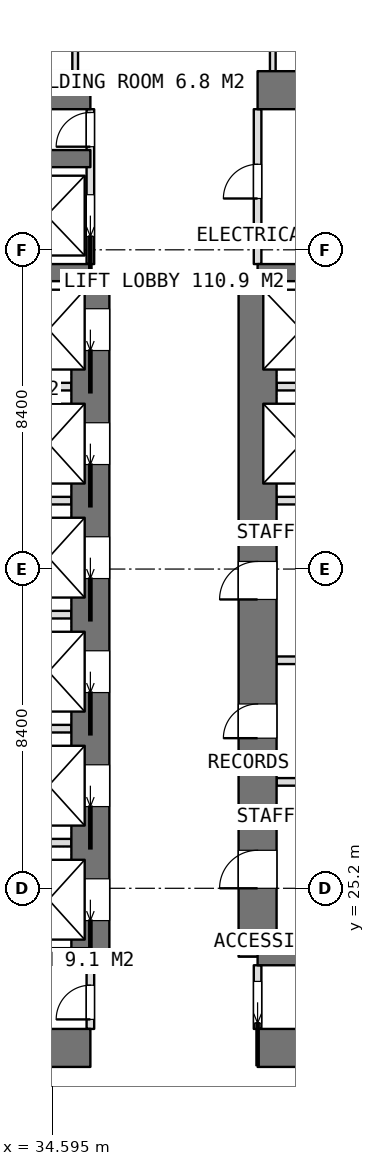
"""IFC4 building model, lengths in metres.
Left out: names, types, materials, properties, quantities, classifications, styles, units other than length and angle.
Written with IfcOpenShell. Run it as: python <this file> out.ifc"""

import sys

from ifc_helpers import new_model, si_unit, direction, frame, frame_2d, origin, place, context, subcontext, project, spatial, rectangle, extrude, element, fill, save


model = new_model("IFC4")
c1 = context("Model", 3, precision=1e-05, world=origin(), true_north=direction((0.0, 1.0)))
c2 = subcontext(c1, "Body", "Model", "MODEL_VIEW")
j1 = project(units=[si_unit("LENGTHUNIT", "METRE"), si_unit("PLANEANGLEUNIT", "RADIAN")], contexts=[c1])
p1 = place(None, origin())
s1 = spatial("IfcSite", under=j1, at=p1, CompositionType="ELEMENT")
p2 = place(p1, origin())
s2 = spatial("IfcBuilding", under=s1, at=p2, CompositionType="ELEMENT")
p3 = place(p2, frame((0.0, 0.0, 228.95)))
s3 = spatial("IfcBuildingStorey", under=s2, at=p3, CompositionType="ELEMENT", Elevation=228.95)
p4 = place(p3, frame((25.2, 21.0, 0.0), z_axis=(0.0, 0.0, 1.0), x_axis=(1.0, 0.0, 0.0)))
e1 = element("IfcWall", 1, at=p4, inside=s3, PredefinedType="SHEAR", context=c2, shape_type="SweptSolid", body=[
    extrude(rectangle(XDim=10.4, YDim=1.0, at=frame_2d((5.2, 0.0))), origin(), (0.0, 0.0, 1.0), 3.75),
])
p5 = place(p3, frame((40.0, 21.0, 0.0), z_axis=(0.0, 0.0, 1.0), x_axis=(1.0, 0.0, 0.0)))
e2 = element("IfcWall", 2, at=p5, inside=s3, PredefinedType="SHEAR", context=c2, shape_type="SweptSolid", body=[
    extrude(rectangle(XDim=10.4, YDim=1.0, at=frame_2d((5.2, 0.0))), origin(), (0.0, 0.0, 1.0), 3.75),
])
p6 = place(p3, frame((25.2, 46.2, 0.0), z_axis=(0.0, 0.0, 1.0), x_axis=(1.0, 0.0, 0.0)))
e3 = element("IfcWall", 3, at=p6, inside=s3, PredefinedType="SHEAR", context=c2, shape_type="SweptSolid", body=[
    extrude(rectangle(XDim=10.4, YDim=1.0, at=frame_2d((5.2, 0.0))), origin(), (0.0, 0.0, 1.0), 3.75),
])
p7 = place(p3, frame((40.0, 46.2, 0.0), z_axis=(0.0, 0.0, 1.0), x_axis=(1.0, 0.0, 0.0)))
e4 = element("IfcWall", 4, at=p7, inside=s3, PredefinedType="SHEAR", context=c2, shape_type="SweptSolid", body=[
    extrude(rectangle(XDim=10.4, YDim=1.0, at=frame_2d((5.2, 0.0))), origin(), (0.0, 0.0, 1.0), 3.75),
])
p8 = place(p3, frame((35.6, 23.4, 0.0), z_axis=(0.0, 0.0, 1.0), x_axis=(0.0, 1.0, 0.0)))
e5 = element("IfcWall", 5, at=p8, inside=s3, PredefinedType="SHEAR", context=c2, shape_type="SweptSolid", body=[
    extrude(rectangle(XDim=18.0, YDim=1.0, at=frame_2d((9.0, 0.0))), origin(), (0.0, 0.0, 1.0), 3.75),
])
p9 = place(p8, frame((0.95, 0.0, 0.0)))
e6 = element("IfcOpeningElement", 6, at=p9, cuts=e5, PredefinedType="OPENING", context=c2, shape_type="SweptSolid", body=[
    extrude(rectangle(XDim=1.1, YDim=2.1, at=frame_2d((0.55, 1.05))), frame((0.0, 0.51, 0.0), z_axis=(0.0, -1.0, 0.0), x_axis=(1.0, 0.0, 0.0)), (0.0, 0.0, 1.0), 1.02),
])
p10 = place(p8, frame((3.95, 0.0, 0.0)))
e7 = element("IfcOpeningElement", 7, at=p10, cuts=e5, PredefinedType="OPENING", context=c2, shape_type="SweptSolid", body=[
    extrude(rectangle(XDim=1.1, YDim=2.1, at=frame_2d((0.55, 1.05))), frame((0.0, 0.51, 0.0), z_axis=(0.0, -1.0, 0.0), x_axis=(1.0, 0.0, 0.0)), (0.0, 0.0, 1.0), 1.02),
])
p11 = place(p8, frame((6.95, 0.0, 0.0)))
e8 = element("IfcOpeningElement", 8, at=p11, cuts=e5, PredefinedType="OPENING", context=c2, shape_type="SweptSolid", body=[
    extrude(rectangle(XDim=1.1, YDim=2.1, at=frame_2d((0.55, 1.05))), frame((0.0, 0.51, 0.0), z_axis=(0.0, -1.0, 0.0), x_axis=(1.0, 0.0, 0.0)), (0.0, 0.0, 1.0), 1.02),
])
p12 = place(p8, frame((9.95, 0.0, 0.0)))
e9 = element("IfcOpeningElement", 9, at=p12, cuts=e5, PredefinedType="OPENING", context=c2, shape_type="SweptSolid", body=[
    extrude(rectangle(XDim=1.1, YDim=2.1, at=frame_2d((0.55, 1.05))), frame((0.0, 0.51, 0.0), z_axis=(0.0, -1.0, 0.0), x_axis=(1.0, 0.0, 0.0)), (0.0, 0.0, 1.0), 1.02),
])
p13 = place(p8, frame((12.95, 0.0, 0.0)))
e10 = element("IfcOpeningElement", 10, at=p13, cuts=e5, PredefinedType="OPENING", context=c2, shape_type="SweptSolid", body=[
    extrude(rectangle(XDim=1.1, YDim=2.1, at=frame_2d((0.55, 1.05))), frame((0.0, 0.51, 0.0), z_axis=(0.0, -1.0, 0.0), x_axis=(1.0, 0.0, 0.0)), (0.0, 0.0, 1.0), 1.02),
])
p14 = place(p8, frame((15.95, 0.0, 0.0)))
e11 = element("IfcOpeningElement", 11, at=p14, cuts=e5, PredefinedType="OPENING", context=c2, shape_type="SweptSolid", body=[
    extrude(rectangle(XDim=1.1, YDim=2.1, at=frame_2d((0.55, 1.05))), frame((0.0, 0.51, 0.0), z_axis=(0.0, -1.0, 0.0), x_axis=(1.0, 0.0, 0.0)), (0.0, 0.0, 1.0), 1.02),
])
p15 = place(p3, frame((40.0, 23.4, 0.0), z_axis=(0.0, 0.0, 1.0), x_axis=(0.0, 1.0, 0.0)))
e12 = element("IfcWall", 12, at=p15, inside=s3, PredefinedType="SHEAR", context=c2, shape_type="SweptSolid", body=[
    extrude(rectangle(XDim=18.0, YDim=1.0, at=frame_2d((9.0, 0.0))), origin(), (0.0, 0.0, 1.0), 3.75),
])
p16 = place(p15, frame((1.8, 0.0, 0.0)))
e13 = element("IfcOpeningElement", 13, at=p16, cuts=e12, PredefinedType="OPENING", context=c2, shape_type="SweptSolid", body=[
    extrude(rectangle(XDim=1.0, YDim=2.1, at=frame_2d((0.5, 1.05))), frame((0.0, 0.51, 0.0), z_axis=(0.0, -1.0, 0.0), x_axis=(1.0, 0.0, 0.0)), (0.0, 0.0, 1.0), 1.02),
])
p17 = place(p15, frame((5.75, 0.0, 0.0)))
e14 = element("IfcOpeningElement", 14, at=p17, cuts=e12, PredefinedType="OPENING", context=c2, shape_type="SweptSolid", body=[
    extrude(rectangle(XDim=0.9, YDim=2.1, at=frame_2d((0.45, 1.05))), frame((0.0, 0.51, 0.0), z_axis=(0.0, -1.0, 0.0), x_axis=(1.0, 0.0, 0.0)), (0.0, 0.0, 1.0), 1.02),
])
p18 = place(p15, frame((9.4, 0.0, 0.0)))
e15 = element("IfcOpeningElement", 15, at=p18, cuts=e12, PredefinedType="OPENING", context=c2, shape_type="SweptSolid", body=[
    extrude(rectangle(XDim=1.0, YDim=2.1, at=frame_2d((0.5, 1.05))), frame((0.0, 0.51, 0.0), z_axis=(0.0, -1.0, 0.0), x_axis=(1.0, 0.0, 0.0)), (0.0, 0.0, 1.0), 1.02),
])
for number, where, z_axis, x_axis in (
    (16, (31.8, 23.4, 0.0), (0.0, 0.0, 1.0), (1.0, 0.0, 0.0)),
    (17, (31.8, 41.4, 0.0), (0.0, 0.0, 1.0), (1.0, 0.0, 0.0)),
    (18, (31.8, 44.4, 0.0), (0.0, 0.0, 1.0), (1.0, 0.0, 0.0)),
    (19, (40.0, 23.4, 0.0), (0.0, 0.0, 1.0), (1.0, 0.0, 0.0)),
    (20, (40.0, 41.4, 0.0), (0.0, 0.0, 1.0), (1.0, 0.0, 0.0)),
):
    element("IfcWall", number, at=place(p3, frame(where, z_axis=z_axis, x_axis=x_axis)), inside=s3, PredefinedType="SHEAR", context=c2, shape_type="SweptSolid", body=[
        extrude(rectangle(XDim=3.8, YDim=0.45, at=frame_2d((1.9, 0.0))), origin(), (0.0, 0.0, 1.0), 3.75),
    ])
for number, where, z_axis, x_axis in (
    (21, (32.025, 26.4, 0.0), (0.0, 0.0, 1.0), (1.0, 0.0, 0.0)),
    (22, (32.025, 29.4, 0.0), (0.0, 0.0, 1.0), (1.0, 0.0, 0.0)),
    (23, (32.025, 32.4, 0.0), (0.0, 0.0, 1.0), (1.0, 0.0, 0.0)),
    (24, (32.025, 35.4, 0.0), (0.0, 0.0, 1.0), (1.0, 0.0, 0.0)),
    (25, (32.025, 38.4, 0.0), (0.0, 0.0, 1.0), (1.0, 0.0, 0.0)),
):
    element("IfcWall", number, at=place(p3, frame(where, z_axis=z_axis, x_axis=x_axis)), inside=s3, PredefinedType="PARTITIONING", context=c2, shape_type="SweptSolid", body=[
        extrude(rectangle(XDim=3.075, YDim=0.2, at=frame_2d((1.538, 0.0))), origin(), (0.0, 0.0, 1.0), 3.5),
    ])
for number, where, z_axis, x_axis in (
    (26, (40.5, 35.4, 0.0), (0.0, 0.0, 1.0), (1.0, 0.0, 0.0)),
    (27, (40.5, 38.4, 0.0), (0.0, 0.0, 1.0), (1.0, 0.0, 0.0)),
):
    element("IfcWall", number, at=place(p3, frame(where, z_axis=z_axis, x_axis=x_axis)), inside=s3, PredefinedType="PARTITIONING", context=c2, shape_type="SweptSolid", body=[
        extrude(rectangle(XDim=3.075, YDim=0.2, at=frame_2d((1.538, 0.0))), origin(), (0.0, 0.0, 1.0), 3.5),
    ])
p19 = place(p3, frame((40.0, 21.5, 0.0), z_axis=(0.0, 0.0, 1.0), x_axis=(0.0, 1.0, 0.0)))
e28 = element("IfcWall", 28, at=p19, inside=s3, PredefinedType="PARTITIONING", context=c2, shape_type="SweptSolid", body=[
    extrude(rectangle(XDim=1.675, YDim=0.2, at=frame_2d((0.837, 0.0))), origin(), (0.0, 0.0, 1.0), 3.5),
])
p20 = place(p19, frame((0.15, 0.0, 0.0)))
e29 = element("IfcOpeningElement", 29, at=p20, cuts=e28, PredefinedType="OPENING", context=c2, shape_type="SweptSolid", body=[
    extrude(rectangle(XDim=1.1, YDim=2.1, at=frame_2d((0.55, 1.05))), frame((0.0, 0.11, 0.0), z_axis=(0.0, -1.0, 0.0), x_axis=(1.0, 0.0, 0.0)), (0.0, 0.0, 1.0), 0.22),
])
p21 = place(p3, frame((40.0, 41.625, 0.0), z_axis=(0.0, 0.0, 1.0), x_axis=(0.0, 1.0, 0.0)))
e30 = element("IfcWall", 30, at=p21, inside=s3, PredefinedType="PARTITIONING", context=c2, shape_type="SweptSolid", body=[
    extrude(rectangle(XDim=4.075, YDim=0.2, at=frame_2d((2.038, 0.0))), origin(), (0.0, 0.0, 1.0), 3.5),
])
p22 = place(p21, frame((1.725, 0.0, 0.0)))
e31 = element("IfcOpeningElement", 31, at=p22, cuts=e30, PredefinedType="OPENING", context=c2, shape_type="SweptSolid", body=[
    extrude(rectangle(XDim=0.9, YDim=2.1, at=frame_2d((0.45, 1.05))), frame((0.0, 0.11, 0.0), z_axis=(0.0, -1.0, 0.0), x_axis=(1.0, 0.0, 0.0)), (0.0, 0.0, 1.0), 0.22),
])
p23 = place(p3, frame((35.6, 41.625, 0.0), z_axis=(0.0, 0.0, 1.0), x_axis=(0.0, 1.0, 0.0)))
e32 = element("IfcWall", 32, at=p23, inside=s3, PredefinedType="PARTITIONING", context=c2, shape_type="SweptSolid", body=[
    extrude(rectangle(XDim=4.075, YDim=0.2, at=frame_2d((2.038, 0.0))), origin(), (0.0, 0.0, 1.0), 3.5),
])
p24 = place(p23, frame((3.088, 0.0, 0.0)))
e33 = element("IfcOpeningElement", 33, at=p24, cuts=e32, PredefinedType="OPENING", context=c2, shape_type="SweptSolid", body=[
    extrude(rectangle(XDim=0.9, YDim=2.1, at=frame_2d((0.45, 1.05))), frame((0.0, 0.11, 0.0), z_axis=(0.0, -1.0, 0.0), x_axis=(1.0, 0.0, 0.0)), (0.0, 0.0, 1.0), 0.22),
])
p25 = place(p23, frame((0.725, 0.0, 0.0)))
e34 = element("IfcOpeningElement", 34, at=p25, cuts=e32, PredefinedType="OPENING", context=c2, shape_type="SweptSolid", body=[
    extrude(rectangle(XDim=1.1, YDim=2.1, at=frame_2d((0.55, 1.05))), frame((0.0, 0.11, 0.0), z_axis=(0.0, -1.0, 0.0), x_axis=(1.0, 0.0, 0.0)), (0.0, 0.0, 1.0), 0.22),
])
p26 = place(p3, frame((35.6, 21.5, 0.0), z_axis=(0.0, 0.0, 1.0), x_axis=(0.0, 1.0, 0.0)))
e35 = element("IfcWall", 35, at=p26, inside=s3, PredefinedType="PARTITIONING", context=c2, shape_type="SweptSolid", body=[
    extrude(rectangle(XDim=1.675, YDim=0.2, at=frame_2d((0.837, 0.0))), origin(), (0.0, 0.0, 1.0), 3.5),
])
p27 = place(p26, frame((0.25, 0.0, 0.0)))
e36 = element("IfcOpeningElement", 36, at=p27, cuts=e35, PredefinedType="OPENING", context=c2, shape_type="SweptSolid", body=[
    extrude(rectangle(XDim=0.9, YDim=2.1, at=frame_2d((0.45, 1.05))), frame((0.0, 0.11, 0.0), z_axis=(0.0, -1.0, 0.0), x_axis=(1.0, 0.0, 0.0)), (0.0, 0.0, 1.0), 0.22),
])
for number, where, z_axis, x_axis in (
    (37, (40.5, 28.0, 0.0), (0.0, 0.0, 1.0), (1.0, 0.0, 0.0)),
    (38, (40.5, 31.2, 0.0), (0.0, 0.0, 1.0), (1.0, 0.0, 0.0)),
):
    element("IfcWall", number, at=place(p3, frame(where, z_axis=z_axis, x_axis=x_axis)), inside=s3, PredefinedType="PARTITIONING", context=c2, shape_type="SweptSolid", body=[
        extrude(rectangle(XDim=3.075, YDim=0.2, at=frame_2d((1.538, 0.0))), origin(), (0.0, 0.0, 1.0), 3.5),
    ])
for number, where, z_axis, x_axis in (
    (39, (40.4, 46.7, 0.0), (0.0, 0.0, 1.0), (0.0, 1.0, 0.0)),
    (40, (35.2, 46.7, 0.0), (0.0, 0.0, 1.0), (0.0, 1.0, 0.0)),
):
    element("IfcWall", number, at=place(p3, frame(where, z_axis=z_axis, x_axis=x_axis)), inside=s3, PredefinedType="PARTITIONING", context=c2, shape_type="SweptSolid", body=[
        extrude(rectangle(XDim=2.625, YDim=0.15, at=frame_2d((1.312, 0.0))), origin(), (0.0, 0.0, 1.0), 3.5),
    ])
p28 = place(p20, origin())
e41 = element("IfcDoor", 41, at=p28, inside=s3, OperationType="SLIDING_TO_LEFT", PredefinedType="DOOR", context=c2, shape_type="SweptSolid", body=[
    extrude(rectangle(XDim=1.1, YDim=2.1, at=frame_2d((0.55, 1.05))), frame((0.0, 0.025, 0.0), z_axis=(0.0, -1.0, 0.0), x_axis=(1.0, 0.0, 0.0)), (0.0, 0.0, 1.0), 0.05),
])
fill(e29, e41)
p29 = place(p27, origin())
e42 = element("IfcDoor", 42, at=p29, inside=s3, OperationType="SINGLE_SWING_LEFT", PredefinedType="DOOR", context=c2, shape_type="SweptSolid", body=[
    extrude(rectangle(XDim=0.9, YDim=2.1, at=frame_2d((0.45, 1.05))), frame((0.0, 0.025, 0.0), z_axis=(0.0, -1.0, 0.0), x_axis=(1.0, 0.0, 0.0)), (0.0, 0.0, 1.0), 0.05),
])
fill(e36, e42)
p30 = place(p22, origin())
e43 = element("IfcDoor", 43, at=p30, inside=s3, OperationType="SINGLE_SWING_LEFT", PredefinedType="DOOR", context=c2, shape_type="SweptSolid", body=[
    extrude(rectangle(XDim=0.9, YDim=2.1, at=frame_2d((0.45, 1.05))), frame((0.0, 0.025, 0.0), z_axis=(0.0, -1.0, 0.0), x_axis=(1.0, 0.0, 0.0)), (0.0, 0.0, 1.0), 0.05),
])
fill(e31, e43)
p31 = place(p16, origin())
e44 = element("IfcDoor", 44, at=p31, inside=s3, OperationType="SINGLE_SWING_LEFT", PredefinedType="DOOR", context=c2, shape_type="SweptSolid", body=[
    extrude(rectangle(XDim=1.0, YDim=2.1, at=frame_2d((0.5, 1.05))), frame((0.0, 0.025, 0.0), z_axis=(0.0, -1.0, 0.0), x_axis=(1.0, 0.0, 0.0)), (0.0, 0.0, 1.0), 0.05),
])
fill(e13, e44)
p32 = place(p17, origin())
e45 = element("IfcDoor", 45, at=p32, inside=s3, OperationType="SINGLE_SWING_LEFT", PredefinedType="DOOR", context=c2, shape_type="SweptSolid", body=[
    extrude(rectangle(XDim=0.9, YDim=2.1, at=frame_2d((0.45, 1.05))), frame((0.0, 0.025, 0.0), z_axis=(0.0, -1.0, 0.0), x_axis=(1.0, 0.0, 0.0)), (0.0, 0.0, 1.0), 0.05),
])
fill(e14, e45)
p33 = place(p18, origin())
e46 = element("IfcDoor", 46, at=p33, inside=s3, OperationType="SINGLE_SWING_LEFT", PredefinedType="DOOR", context=c2, shape_type="SweptSolid", body=[
    extrude(rectangle(XDim=1.0, YDim=2.1, at=frame_2d((0.5, 1.05))), frame((0.0, 0.025, 0.0), z_axis=(0.0, -1.0, 0.0), x_axis=(1.0, 0.0, 0.0)), (0.0, 0.0, 1.0), 0.05),
])
fill(e15, e46)
p34 = place(p24, origin())
e47 = element("IfcDoor", 47, at=p34, inside=s3, OperationType="SINGLE_SWING_LEFT", PredefinedType="DOOR", context=c2, shape_type="SweptSolid", body=[
    extrude(rectangle(XDim=0.9, YDim=2.1, at=frame_2d((0.45, 1.05))), frame((0.0, 0.025, 0.0), z_axis=(0.0, -1.0, 0.0), x_axis=(1.0, 0.0, 0.0)), (0.0, 0.0, 1.0), 0.05),
])
fill(e33, e47)
p35 = place(p9, origin())
e48 = element("IfcDoor", 48, at=p35, inside=s3, OperationType="SLIDING_TO_LEFT", PredefinedType="USERDEFINED", context=c2, shape_type="SweptSolid", body=[
    extrude(rectangle(XDim=1.1, YDim=2.1, at=frame_2d((0.55, 1.05))), frame((0.0, 0.025, 0.0), z_axis=(0.0, -1.0, 0.0), x_axis=(1.0, 0.0, 0.0)), (0.0, 0.0, 1.0), 0.05),
])
fill(e6, e48)
p36 = place(p10, origin())
e49 = element("IfcDoor", 49, at=p36, inside=s3, OperationType="SLIDING_TO_LEFT", PredefinedType="USERDEFINED", context=c2, shape_type="SweptSolid", body=[
    extrude(rectangle(XDim=1.1, YDim=2.1, at=frame_2d((0.55, 1.05))), frame((0.0, 0.025, 0.0), z_axis=(0.0, -1.0, 0.0), x_axis=(1.0, 0.0, 0.0)), (0.0, 0.0, 1.0), 0.05),
])
fill(e7, e49)
p37 = place(p11, origin())
e50 = element("IfcDoor", 50, at=p37, inside=s3, OperationType="SLIDING_TO_LEFT", PredefinedType="USERDEFINED", context=c2, shape_type="SweptSolid", body=[
    extrude(rectangle(XDim=1.1, YDim=2.1, at=frame_2d((0.55, 1.05))), frame((0.0, 0.025, 0.0), z_axis=(0.0, -1.0, 0.0), x_axis=(1.0, 0.0, 0.0)), (0.0, 0.0, 1.0), 0.05),
])
fill(e8, e50)
p38 = place(p12, origin())
e51 = element("IfcDoor", 51, at=p38, inside=s3, OperationType="SLIDING_TO_LEFT", PredefinedType="USERDEFINED", context=c2, shape_type="SweptSolid", body=[
    extrude(rectangle(XDim=1.1, YDim=2.1, at=frame_2d((0.55, 1.05))), frame((0.0, 0.025, 0.0), z_axis=(0.0, -1.0, 0.0), x_axis=(1.0, 0.0, 0.0)), (0.0, 0.0, 1.0), 0.05),
])
fill(e9, e51)
p39 = place(p13, origin())
e52 = element("IfcDoor", 52, at=p39, inside=s3, OperationType="SLIDING_TO_LEFT", PredefinedType="USERDEFINED", context=c2, shape_type="SweptSolid", body=[
    extrude(rectangle(XDim=1.1, YDim=2.1, at=frame_2d((0.55, 1.05))), frame((0.0, 0.025, 0.0), z_axis=(0.0, -1.0, 0.0), x_axis=(1.0, 0.0, 0.0)), (0.0, 0.0, 1.0), 0.05),
])
fill(e10, e52)
p40 = place(p14, origin())
e53 = element("IfcDoor", 53, at=p40, inside=s3, OperationType="SLIDING_TO_LEFT", PredefinedType="USERDEFINED", context=c2, shape_type="SweptSolid", body=[
    extrude(rectangle(XDim=1.1, YDim=2.1, at=frame_2d((0.55, 1.05))), frame((0.0, 0.025, 0.0), z_axis=(0.0, -1.0, 0.0), x_axis=(1.0, 0.0, 0.0)), (0.0, 0.0, 1.0), 0.05),
])
fill(e11, e53)
p41 = place(p25, origin())
e54 = element("IfcDoor", 54, at=p41, inside=s3, OperationType="SLIDING_TO_LEFT", PredefinedType="USERDEFINED", context=c2, shape_type="SweptSolid", body=[
    extrude(rectangle(XDim=1.1, YDim=2.1, at=frame_2d((0.55, 1.05))), frame((0.0, 0.025, 0.0), z_axis=(0.0, -1.0, 0.0), x_axis=(1.0, 0.0, 0.0)), (0.0, 0.0, 1.0), 0.05),
])
fill(e34, e54)
save(model, sys.argv[1])
